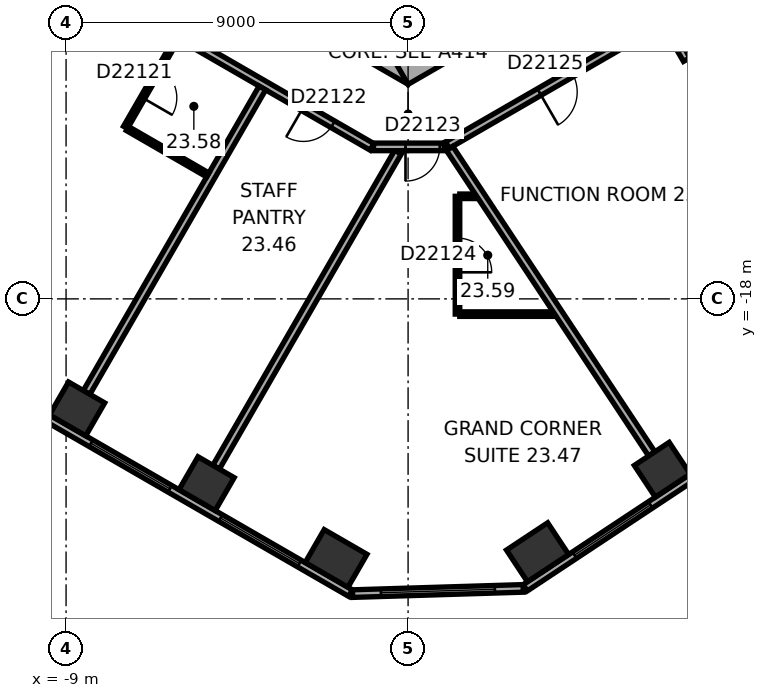
"""IFC4 building model, lengths in metres.
Left out: names, types, materials, properties, quantities, classifications, styles, units other than length and angle.
Written with IfcOpenShell. Run it as: python <this file> out.ifc"""

import sys

from ifc_helpers import new_model, si_unit, direction, frame, frame_2d, origin, origin_2d, place, context, subcontext, project, spatial, rectangle, extrude, element, fill, save


model = new_model("IFC4")
c1 = context("Model", 3, precision=1e-05, world=origin(), true_north=direction((0.0, 1.0)))
c2 = subcontext(c1, "Body", "Model", "MODEL_VIEW")
j1 = project(units=[si_unit("LENGTHUNIT", "METRE"), si_unit("PLANEANGLEUNIT", "RADIAN")], contexts=[c1])
p1 = place(None, origin())
s1 = spatial("IfcSite", under=j1, at=p1, CompositionType="ELEMENT")
p2 = place(p1, origin())
s2 = spatial("IfcBuilding", under=s1, at=p2, CompositionType="ELEMENT")
p3 = place(p2, frame((0.0, 0.0, 100.1)))
s3 = spatial("IfcBuildingStorey", under=s2, at=p3, CompositionType="ELEMENT", Elevation=100.1)
for number, where, z_axis, x_axis in (
    (1, (-8.71, -20.895, 0.0), (0.0, 0.0, 1.0), (0.866, -0.5, 0.0)),
    (2, (-5.302, -22.862, 0.0), (0.0, 0.0, 1.0), (0.866, -0.5, 0.0)),
):
    element("IfcColumn", number, at=place(p3, frame(where, z_axis=z_axis, x_axis=x_axis)), inside=s3, PredefinedType="COLUMN", context=c2, shape_type="SweptSolid", body=[
        extrude(rectangle(XDim=1.1, YDim=1.0, at=origin_2d()), origin(), (0.0, 0.0, 1.0), 3.3),
    ])
for number, where, z_axis, x_axis in (
    (3, (-1.895, -24.829, 0.0), (0.0, 0.0, 1.0), (0.866, -0.5, 0.0)),
    (4, (3.407, -24.667, 0.0), (0.0, 0.0, 1.0), (0.834, 0.552, 0.0)),
):
    element("IfcColumn", number, at=place(p3, frame(where, z_axis=z_axis, x_axis=x_axis)), inside=s3, PredefinedType="COLUMN", context=c2, shape_type="SweptSolid", body=[
        extrude(rectangle(XDim=1.3, YDim=1.0, at=origin_2d()), origin(), (0.0, 0.0, 1.0), 3.3),
    ])
p4 = place(p3, frame((6.688, -22.496, 0.0), z_axis=(0.0, 0.0, 1.0), x_axis=(0.833885822067, 0.551936985312, 0.0)))
e5 = element("IfcColumn", 5, at=p4, inside=s3, PredefinedType="COLUMN", context=c2, shape_type="SweptSolid", body=[
    extrude(rectangle(XDim=1.1, YDim=1.0, at=origin_2d()), origin(), (0.0, 0.0, 1.0), 3.3),
])
p5 = place(p3, frame((-10.4, -5.658, 0.0), z_axis=(0.0, 0.0, 1.0), x_axis=(0.866021384402, -0.500006961711, 0.0)))
e6 = element("IfcWall", 6, at=p5, inside=s3, PredefinedType="SHEAR", context=c2, shape_type="SweptSolid", body=[
    extrude(rectangle(XDim=12.355, YDim=1.2, at=frame_2d((6.178, 0.0))), origin(), (0.0, 0.0, 1.0), 3.3),
])
p6 = place(p5, frame((6.378, 0.0, 0.0)))
e7 = element("IfcOpeningElement", 7, at=p6, cuts=e6, PredefinedType="OPENING", context=c2, shape_type="SweptSolid", body=[
    extrude(rectangle(XDim=1.5, YDim=2.1, at=frame_2d((0.75, 1.05))), frame((0.0, 0.61, 0.0), z_axis=(0.0, -1.0, 0.0), x_axis=(1.0, 0.0, 0.0)), (0.0, 0.0, 1.0), 1.22),
])
p7 = place(p5, frame((3.228, 0.0, 0.0)))
e8 = element("IfcOpeningElement", 8, at=p7, cuts=e6, PredefinedType="OPENING", context=c2, shape_type="SweptSolid", body=[
    extrude(rectangle(XDim=0.9, YDim=2.1, at=frame_2d((0.45, 1.05))), frame((0.0, 0.61, 0.0), z_axis=(0.0, -1.0, 0.0), x_axis=(1.0, 0.0, 0.0)), (0.0, 0.0, 1.0), 1.22),
])
p8 = place(p3, frame((-0.3, -11.836, 0.0), z_axis=(0.0, 0.0, 1.0), x_axis=(0.866021384402, 0.500006961711, 0.0)))
e9 = element("IfcWall", 9, at=p8, inside=s3, PredefinedType="SHEAR", context=c2, shape_type="SweptSolid", body=[
    extrude(rectangle(XDim=12.355, YDim=1.2, at=frame_2d((6.178, 0.0))), origin(), (0.0, 0.0, 1.0), 3.3),
])
p9 = place(p8, frame((2.828, 0.0, 0.0)))
e10 = element("IfcOpeningElement", 10, at=p9, cuts=e9, PredefinedType="OPENING", context=c2, shape_type="SweptSolid", body=[
    extrude(rectangle(XDim=0.9, YDim=2.1, at=frame_2d((0.45, 1.05))), frame((0.0, 0.61, 0.0), z_axis=(0.0, -1.0, 0.0), x_axis=(1.0, 0.0, 0.0)), (0.0, 0.0, 1.0), 1.22),
])
p10 = place(p8, frame((5.428, 0.0, 0.0)))
e11 = element("IfcOpeningElement", 11, at=p10, cuts=e9, PredefinedType="OPENING", context=c2, shape_type="SweptSolid", body=[
    extrude(rectangle(XDim=0.9, YDim=2.1, at=frame_2d((0.45, 1.05))), frame((0.0, 0.61, 0.0), z_axis=(0.0, -1.0, 0.0), x_axis=(1.0, 0.0, 0.0)), (0.0, 0.0, 1.0), 1.22),
])
p11 = place(p8, frame((7.928, 0.0, 0.0)))
e12 = element("IfcOpeningElement", 12, at=p11, cuts=e9, PredefinedType="OPENING", context=c2, shape_type="SweptSolid", body=[
    extrude(rectangle(XDim=1.1, YDim=2.1, at=frame_2d((0.55, 1.05))), frame((0.0, 0.61, 0.0), z_axis=(0.0, -1.0, 0.0), x_axis=(1.0, 0.0, 0.0)), (0.0, 0.0, 1.0), 1.22),
])
p12 = place(p3, frame((-19.914, -15.119, 0.0), z_axis=(0.0, 0.0, 1.0), x_axis=(0.866025418898, -0.499999973822, 0.0)))
e13 = element("IfcWall", 13, at=p12, inside=s3, PredefinedType="STANDARD", context=c2, shape_type="SweptSolid", body=[
    extrude(rectangle(XDim=21.246, YDim=0.2, at=frame_2d((10.623, 0.0))), origin(), (0.0, 0.0, 1.0), 3.3),
])
p13 = place(p12, frame((1.555, 0.0, 0.8)))
e14 = element("IfcOpeningElement", 14, at=p13, cuts=e13, PredefinedType="OPENING", context=c2, shape_type="SweptSolid", body=[
    extrude(rectangle(XDim=2.4, YDim=1.7, at=frame_2d((1.2, 0.85))), frame((0.0, 0.11, 0.0), z_axis=(0.0, -1.0, 0.0), x_axis=(1.0, 0.0, 0.0)), (0.0, 0.0, 1.0), 0.22),
])
p14 = place(p12, frame((5.489, 0.0, 0.8)))
e15 = element("IfcOpeningElement", 15, at=p14, cuts=e13, PredefinedType="OPENING", context=c2, shape_type="SweptSolid", body=[
    extrude(rectangle(XDim=2.4, YDim=1.7, at=frame_2d((1.2, 0.85))), frame((0.0, 0.11, 0.0), z_axis=(0.0, -1.0, 0.0), x_axis=(1.0, 0.0, 0.0)), (0.0, 0.0, 1.0), 0.22),
])
p15 = place(p12, frame((9.424, 0.0, 0.8)))
e16 = element("IfcOpeningElement", 16, at=p15, cuts=e13, PredefinedType="OPENING", context=c2, shape_type="SweptSolid", body=[
    extrude(rectangle(XDim=2.4, YDim=1.7, at=frame_2d((1.2, 0.85))), frame((0.0, 0.11, 0.0), z_axis=(0.0, -1.0, 0.0), x_axis=(1.0, 0.0, 0.0)), (0.0, 0.0, 1.0), 0.22),
])
p16 = place(p12, frame((13.358, 0.0, 0.8)))
e17 = element("IfcOpeningElement", 17, at=p16, cuts=e13, PredefinedType="OPENING", context=c2, shape_type="SweptSolid", body=[
    extrude(rectangle(XDim=2.4, YDim=1.7, at=frame_2d((1.2, 0.85))), frame((0.0, 0.11, 0.0), z_axis=(0.0, -1.0, 0.0), x_axis=(1.0, 0.0, 0.0)), (0.0, 0.0, 1.0), 0.22),
])
p17 = place(p12, frame((17.293, 0.0, 0.8)))
e18 = element("IfcOpeningElement", 18, at=p17, cuts=e13, PredefinedType="OPENING", context=c2, shape_type="SweptSolid", body=[
    extrude(rectangle(XDim=2.4, YDim=1.7, at=frame_2d((1.2, 0.85))), frame((0.0, 0.11, 0.0), z_axis=(0.0, -1.0, 0.0), x_axis=(1.0, 0.0, 0.0)), (0.0, 0.0, 1.0), 0.22),
])
p18 = place(p3, frame((-1.461, -25.755, 0.0), z_axis=(0.0, 0.0, 1.0), x_axis=(0.999533823446, 0.030530898895, 0.0)))
e19 = element("IfcWall", 19, at=p18, inside=s3, PredefinedType="STANDARD", context=c2, shape_type="SweptSolid", body=[
    extrude(rectangle(XDim=4.494, YDim=0.2, at=frame_2d((2.247, 0.0))), origin(), (0.0, 0.0, 1.0), 3.3),
])
p19 = place(p18, frame((0.747, 0.0, 0.8)))
e20 = element("IfcOpeningElement", 20, at=p19, cuts=e19, PredefinedType="OPENING", context=c2, shape_type="SweptSolid", body=[
    extrude(rectangle(XDim=3.0, YDim=1.7, at=frame_2d((1.5, 0.85))), frame((0.0, 0.11, 0.0), z_axis=(0.0, -1.0, 0.0), x_axis=(1.0, 0.0, 0.0)), (0.0, 0.0, 1.0), 0.22),
])
p20 = place(p3, frame((3.083, -25.601, 0.0), z_axis=(0.0, 0.0, 1.0), x_axis=(0.833884295743, 0.551939291329, 0.0)))
e21 = element("IfcWall", 21, at=p20, inside=s3, PredefinedType="STANDARD", context=c2, shape_type="SweptSolid", body=[
    extrude(rectangle(XDim=21.246, YDim=0.2, at=frame_2d((10.623, 0.0))), origin(), (0.0, 0.0, 1.0), 3.3),
])
p21 = place(p20, frame((1.553, 0.0, 0.8)))
e22 = element("IfcOpeningElement", 22, at=p21, cuts=e21, PredefinedType="OPENING", context=c2, shape_type="SweptSolid", body=[
    extrude(rectangle(XDim=2.4, YDim=1.7, at=frame_2d((1.2, 0.85))), frame((0.0, 0.11, 0.0), z_axis=(0.0, -1.0, 0.0), x_axis=(1.0, 0.0, 0.0)), (0.0, 0.0, 1.0), 0.22),
])
p22 = place(p20, frame((5.488, 0.0, 0.8)))
e23 = element("IfcOpeningElement", 23, at=p22, cuts=e21, PredefinedType="OPENING", context=c2, shape_type="SweptSolid", body=[
    extrude(rectangle(XDim=2.4, YDim=1.7, at=frame_2d((1.2, 0.85))), frame((0.0, 0.11, 0.0), z_axis=(0.0, -1.0, 0.0), x_axis=(1.0, 0.0, 0.0)), (0.0, 0.0, 1.0), 0.22),
])
p23 = place(p20, frame((9.422, 0.0, 0.8)))
e24 = element("IfcOpeningElement", 24, at=p23, cuts=e21, PredefinedType="OPENING", context=c2, shape_type="SweptSolid", body=[
    extrude(rectangle(XDim=2.4, YDim=1.7, at=frame_2d((1.2, 0.85))), frame((0.0, 0.11, 0.0), z_axis=(0.0, -1.0, 0.0), x_axis=(1.0, 0.0, 0.0)), (0.0, 0.0, 1.0), 0.22),
])
p24 = place(p20, frame((13.357, 0.0, 0.8)))
e25 = element("IfcOpeningElement", 25, at=p24, cuts=e21, PredefinedType="OPENING", context=c2, shape_type="SweptSolid", body=[
    extrude(rectangle(XDim=2.4, YDim=1.7, at=frame_2d((1.2, 0.85))), frame((0.0, 0.11, 0.0), z_axis=(0.0, -1.0, 0.0), x_axis=(1.0, 0.0, 0.0)), (0.0, 0.0, 1.0), 0.22),
])
p25 = place(p20, frame((17.291, 0.0, 0.8)))
e26 = element("IfcOpeningElement", 26, at=p25, cuts=e21, PredefinedType="OPENING", context=c2, shape_type="SweptSolid", body=[
    extrude(rectangle(XDim=2.4, YDim=1.7, at=frame_2d((1.2, 0.85))), frame((0.0, 0.11, 0.0), z_axis=(0.0, -1.0, 0.0), x_axis=(1.0, 0.0, 0.0)), (0.0, 0.0, 1.0), 0.22),
])
p26 = place(p3, frame((-11.615, -7.843, 0.0), z_axis=(0.0, 0.0, 1.0), x_axis=(0.866026466995, -0.499998158461, 0.0)))
e27 = element("IfcWall", 27, at=p26, inside=s3, PredefinedType="PARTITIONING", context=c2, shape_type="SweptSolid", body=[
    extrude(rectangle(XDim=12.315, YDim=0.2, at=frame_2d((6.158, 0.0))), origin(), (0.0, 0.0, 1.0), 3.05),
])
p27 = place(p26, frame((3.333, 0.0, 0.0)))
e28 = element("IfcOpeningElement", 28, at=p27, cuts=e27, PredefinedType="OPENING", context=c2, shape_type="SweptSolid", body=[
    extrude(rectangle(XDim=0.9, YDim=2.1, at=frame_2d((0.45, 1.05))), frame((0.0, 0.11, 0.0), z_axis=(0.0, -1.0, 0.0), x_axis=(1.0, 0.0, 0.0)), (0.0, 0.0, 1.0), 0.22),
])
p28 = place(p26, frame((10.229, 0.0, 0.0)))
e29 = element("IfcOpeningElement", 29, at=p28, cuts=e27, PredefinedType="OPENING", context=c2, shape_type="SweptSolid", body=[
    extrude(rectangle(XDim=0.9, YDim=2.1, at=frame_2d((0.45, 1.05))), frame((0.0, 0.11, 0.0), z_axis=(0.0, -1.0, 0.0), x_axis=(1.0, 0.0, 0.0)), (0.0, 0.0, 1.0), 0.22),
])
p29 = place(p3, frame((-8.46, -20.461, 0.0), z_axis=(0.0, 0.0, 1.0), x_axis=(0.499999662836, 0.866025598446, 0.0)))
e30 = element("IfcWall", 30, at=p29, inside=s3, PredefinedType="PARTITIONING", context=c2, shape_type="SweptSolid", body=[
    extrude(rectangle(XDim=9.25, YDim=0.2, at=frame_2d((4.625, 0.0))), origin(), (0.0, 0.0, 1.0), 3.05),
])
p30 = place(p3, frame((-7.436, -13.489, 0.0), z_axis=(0.0, 0.0, 1.0), x_axis=(0.500048589285, 0.86599734893, 0.0)))
e31 = element("IfcWall", 31, at=p30, inside=s3, PredefinedType="PARTITIONING", context=c2, shape_type="SweptSolid", body=[
    extrude(rectangle(XDim=2.7, YDim=0.12, at=frame_2d((1.35, 0.0))), origin(), (0.0, 0.0, 1.0), 3.05),
])
p31 = place(p30, frame((0.9, 0.0, 0.0)))
e32 = element("IfcOpeningElement", 32, at=p31, cuts=e31, PredefinedType="OPENING", context=c2, shape_type="SweptSolid", body=[
    extrude(rectangle(XDim=0.9, YDim=2.1, at=frame_2d((0.45, 1.05))), frame((0.0, 0.07, 0.0), z_axis=(0.0, -1.0, 0.0), x_axis=(1.0, 0.0, 0.0)), (0.0, 0.0, 1.0), 0.14),
])
p32 = place(p3, frame((-5.271, -14.739, 0.0), z_axis=(0.0, 0.0, 1.0), x_axis=(-0.866023955769, 0.500002508028, 0.0)))
e33 = element("IfcWall", 33, at=p32, inside=s3, PredefinedType="PARTITIONING", context=c2, shape_type="SweptSolid", body=[
    extrude(rectangle(XDim=2.44, YDim=0.12, at=frame_2d((1.22, 0.0))), origin(), (0.0, 0.0, 1.0), 3.05),
])
p33 = place(p3, frame((-5.052, -22.429, 0.0), z_axis=(0.0, 0.0, 1.0), x_axis=(0.500004329283, 0.866022904257, 0.0)))
e34 = element("IfcWall", 34, at=p33, inside=s3, PredefinedType="PARTITIONING", context=c2, shape_type="SweptSolid", body=[
    extrude(rectangle(XDim=9.572, YDim=0.2, at=frame_2d((4.786, 0.0))), origin(), (0.0, 0.0, 1.0), 3.05),
])
p34 = place(p3, frame((-0.91, -14.001, 0.0), z_axis=(0.0, 0.0, 1.0), x_axis=(1.0, 0.0, 0.0)))
e35 = element("IfcWall", 35, at=p34, inside=s3, PredefinedType="PARTITIONING", context=c2, shape_type="SweptSolid", body=[
    extrude(rectangle(XDim=1.86, YDim=0.2, at=frame_2d((0.93, 0.0))), origin(), (0.0, 0.0, 1.0), 3.05),
])
p35 = place(p34, frame((0.842, 0.0, 0.0)))
e36 = element("IfcOpeningElement", 36, at=p35, cuts=e35, PredefinedType="OPENING", context=c2, shape_type="SweptSolid", body=[
    extrude(rectangle(XDim=0.9, YDim=2.1, at=frame_2d((0.45, 1.05))), frame((0.0, 0.11, 0.0), z_axis=(0.0, -1.0, 0.0), x_axis=(1.0, 0.0, 0.0)), (0.0, 0.0, 1.0), 0.22),
])
p36 = place(p3, frame((1.033, -13.953, 0.0), z_axis=(0.0, 0.0, 1.0), x_axis=(0.866017531406, 0.500013635111, 0.0)))
e37 = element("IfcWall", 37, at=p36, inside=s3, PredefinedType="PARTITIONING", context=c2, shape_type="SweptSolid", body=[
    extrude(rectangle(XDim=6.58, YDim=0.2, at=frame_2d((3.29, 0.0))), origin(), (0.0, 0.0, 1.0), 3.05),
])
p37 = place(p36, frame((2.79, 0.0, 0.0)))
e38 = element("IfcOpeningElement", 38, at=p37, cuts=e37, PredefinedType="OPENING", context=c2, shape_type="SweptSolid", body=[
    extrude(rectangle(XDim=1.0, YDim=2.1, at=frame_2d((0.5, 1.05))), frame((0.0, 0.11, 0.0), z_axis=(0.0, -1.0, 0.0), x_axis=(1.0, 0.0, 0.0)), (0.0, 0.0, 1.0), 0.22),
])
p38 = place(p3, frame((1.3, -18.401, 0.0), z_axis=(0.0, 0.0, 1.0), x_axis=(0.0, 1.0, 0.0)))
e39 = element("IfcWall", 39, at=p38, inside=s3, PredefinedType="PARTITIONING", context=c2, shape_type="SweptSolid", body=[
    extrude(rectangle(XDim=3.1, YDim=0.12, at=frame_2d((1.55, 0.0))), origin(), (0.0, 0.0, 1.0), 3.05),
])
p39 = place(p38, frame((1.1, 0.0, 0.0)))
e40 = element("IfcOpeningElement", 40, at=p39, cuts=e39, PredefinedType="OPENING", context=c2, shape_type="SweptSolid", body=[
    extrude(rectangle(XDim=0.9, YDim=2.1, at=frame_2d((0.45, 1.05))), frame((0.0, 0.07, 0.0), z_axis=(0.0, -1.0, 0.0), x_axis=(1.0, 0.0, 0.0)), (0.0, 0.0, 1.0), 0.14),
])
p40 = place(p3, frame((1.36, -15.301, 0.0), z_axis=(0.0, 0.0, 1.0), x_axis=(1.0, 0.0, 0.0)))
e41 = element("IfcWall", 41, at=p40, inside=s3, PredefinedType="PARTITIONING", context=c2, shape_type="SweptSolid", body=[
    extrude(rectangle(XDim=0.416, YDim=0.12, at=frame_2d((0.208, 0.0))), origin(), (0.0, 0.0, 1.0), 3.05),
])
p41 = place(p3, frame((3.828, -18.401, 0.0), z_axis=(0.0, 0.0, 1.0), x_axis=(-1.0, 0.0, 0.0)))
e42 = element("IfcWall", 42, at=p41, inside=s3, PredefinedType="PARTITIONING", context=c2, shape_type="SweptSolid", body=[
    extrude(rectangle(XDim=2.468, YDim=0.12, at=frame_2d((1.234, 0.0))), origin(), (0.0, 0.0, 1.0), 3.05),
])
p42 = place(p3, frame((6.412, -22.079, 0.0), z_axis=(0.0, 0.0, 1.0), x_axis=(-0.551919507115, 0.83389739037, 0.0)))
e43 = element("IfcWall", 43, at=p42, inside=s3, PredefinedType="PARTITIONING", context=c2, shape_type="SweptSolid", body=[
    extrude(rectangle(XDim=9.635, YDim=0.2, at=frame_2d((4.817, 0.0))), origin(), (0.0, 0.0, 1.0), 3.05),
])
p43 = place(p3, frame((6.782, -10.749, 0.0), z_axis=(0.0, 0.0, 1.0), x_axis=(0.500074377092, -0.865982457891, 0.0)))
e44 = element("IfcWall", 44, at=p43, inside=s3, PredefinedType="PARTITIONING", context=c2, shape_type="SweptSolid", body=[
    extrude(rectangle(XDim=1.101, YDim=0.2, at=frame_2d((0.55, 0.0))), origin(), (0.0, 0.0, 1.0), 3.05),
])
p44 = place(p16, origin())
e45 = element("IfcWindow", 45, at=p44, inside=s3, PartitioningType="SINGLE_PANEL", PredefinedType="WINDOW", context=c2, shape_type="SweptSolid", body=[
    extrude(rectangle(XDim=2.4, YDim=1.7, at=frame_2d((1.2, 0.85))), frame((0.0, 0.03, 0.0), z_axis=(0.0, -1.0, 0.0), x_axis=(1.0, 0.0, 0.0)), (0.0, 0.0, 1.0), 0.06),
])
fill(e17, e45)
p45 = place(p17, origin())
e46 = element("IfcWindow", 46, at=p45, inside=s3, PartitioningType="SINGLE_PANEL", PredefinedType="WINDOW", context=c2, shape_type="SweptSolid", body=[
    extrude(rectangle(XDim=2.4, YDim=1.7, at=frame_2d((1.2, 0.85))), frame((0.0, 0.03, 0.0), z_axis=(0.0, -1.0, 0.0), x_axis=(1.0, 0.0, 0.0)), (0.0, 0.0, 1.0), 0.06),
])
fill(e18, e46)
p46 = place(p19, origin())
e47 = element("IfcWindow", 47, at=p46, inside=s3, PartitioningType="SINGLE_PANEL", PredefinedType="WINDOW", context=c2, shape_type="SweptSolid", body=[
    extrude(rectangle(XDim=3.0, YDim=1.7, at=frame_2d((1.5, 0.85))), frame((0.0, 0.03, 0.0), z_axis=(0.0, -1.0, 0.0), x_axis=(1.0, 0.0, 0.0)), (0.0, 0.0, 1.0), 0.06),
])
fill(e20, e47)
p47 = place(p21, origin())
e48 = element("IfcWindow", 48, at=p47, inside=s3, PartitioningType="SINGLE_PANEL", PredefinedType="WINDOW", context=c2, shape_type="SweptSolid", body=[
    extrude(rectangle(XDim=2.4, YDim=1.7, at=frame_2d((1.2, 0.85))), frame((0.0, 0.03, 0.0), z_axis=(0.0, -1.0, 0.0), x_axis=(1.0, 0.0, 0.0)), (0.0, 0.0, 1.0), 0.06),
])
fill(e22, e48)
p48 = place(p31, origin())
e49 = element("IfcDoor", 49, at=p48, inside=s3, OperationType="SINGLE_SWING_LEFT", PredefinedType="DOOR", context=c2, shape_type="SweptSolid", body=[
    extrude(rectangle(XDim=0.9, YDim=2.1, at=frame_2d((0.45, 1.05))), frame((0.0, 0.025, 0.0), z_axis=(0.0, -1.0, 0.0), x_axis=(1.0, 0.0, 0.0)), (0.0, 0.0, 1.0), 0.05),
])
fill(e32, e49)
p49 = place(p28, origin())
e50 = element("IfcDoor", 50, at=p49, inside=s3, OperationType="SINGLE_SWING_LEFT", PredefinedType="DOOR", context=c2, shape_type="SweptSolid", body=[
    extrude(rectangle(XDim=0.9, YDim=2.1, at=frame_2d((0.45, 1.05))), frame((0.0, 0.025, 0.0), z_axis=(0.0, -1.0, 0.0), x_axis=(1.0, 0.0, 0.0)), (0.0, 0.0, 1.0), 0.05),
])
fill(e29, e50)
p50 = place(p35, origin())
e51 = element("IfcDoor", 51, at=p50, inside=s3, OperationType="SINGLE_SWING_LEFT", PredefinedType="DOOR", context=c2, shape_type="SweptSolid", body=[
    extrude(rectangle(XDim=0.9, YDim=2.1, at=frame_2d((0.45, 1.05))), frame((0.0, 0.025, 0.0), z_axis=(0.0, -1.0, 0.0), x_axis=(1.0, 0.0, 0.0)), (0.0, 0.0, 1.0), 0.05),
])
fill(e36, e51)
p51 = place(p39, origin())
e52 = element("IfcDoor", 52, at=p51, inside=s3, OperationType="SINGLE_SWING_LEFT", PredefinedType="DOOR", context=c2, shape_type="SweptSolid", body=[
    extrude(rectangle(XDim=0.9, YDim=2.1, at=frame_2d((0.45, 1.05))), frame((0.0, 0.025, 0.0), z_axis=(0.0, -1.0, 0.0), x_axis=(1.0, 0.0, 0.0)), (0.0, 0.0, 1.0), 0.05),
])
fill(e40, e52)
p52 = place(p37, origin())
e53 = element("IfcDoor", 53, at=p52, inside=s3, OperationType="SINGLE_SWING_LEFT", PredefinedType="DOOR", context=c2, shape_type="SweptSolid", body=[
    extrude(rectangle(XDim=1.0, YDim=2.1, at=frame_2d((0.5, 1.05))), frame((0.0, 0.025, 0.0), z_axis=(0.0, -1.0, 0.0), x_axis=(1.0, 0.0, 0.0)), (0.0, 0.0, 1.0), 0.05),
])
fill(e38, e53)
save(model, sys.argv[1])
